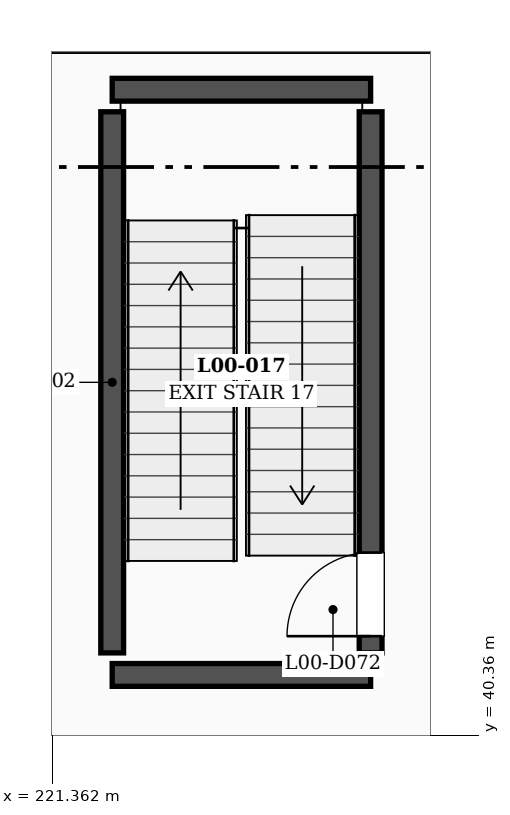
"""IFC4 building model, lengths in metres.
Left out: names, types, materials, properties, quantities, classifications, styles, units other than length and angle.
Written with IfcOpenShell. Run it as: python <this file> out.ifc"""

import sys

from ifc_helpers import new_model, si_unit, direction, frame, frame_2d, origin, place, context, subcontext, project, spatial, rectangle, extrude, element, fill, save


model = new_model("IFC4")
c1 = context("Model", 3, precision=1e-05, world=origin(), true_north=direction((0.0, 1.0)))
c2 = subcontext(c1, "Body", "Model", "MODEL_VIEW")
j1 = project(units=[si_unit("LENGTHUNIT", "METRE"), si_unit("PLANEANGLEUNIT", "RADIAN")], contexts=[c1])
p1 = place(None, origin())
s1 = spatial("IfcSite", under=j1, at=p1, CompositionType="ELEMENT")
p2 = place(p1, origin())
s2 = spatial("IfcBuilding", under=s1, at=p2, CompositionType="ELEMENT")
p3 = place(p2, origin())
s3 = spatial("IfcBuildingStorey", under=s2, at=p3, CompositionType="ELEMENT", Elevation=0.0)
for number, where, z_axis, x_axis in (
    (1, (222.15, 41.15, 0.0), (0.0, 0.0, 1.0), (1.0, 0.0, 0.0)),
    (2, (222.15, 48.85, 0.0), (0.0, 0.0, 1.0), (1.0, 0.0, 0.0)),
):
    element("IfcWall", number, at=place(p3, frame(where, z_axis=z_axis, x_axis=x_axis)), inside=s3, PredefinedType="SHEAR", context=c2, shape_type="SweptSolid", body=[
        extrude(rectangle(XDim=3.4, YDim=0.3, at=frame_2d((1.7, 0.0))), origin(), (0.0, 0.0, 1.0), 6.0),
    ])
p4 = place(p3, frame((222.15, 41.44, 0.0), z_axis=(0.0, 0.0, 1.0), x_axis=(0.0, 1.0, 0.0)))
e3 = element("IfcWall", 3, at=p4, inside=s3, PredefinedType="SHEAR", context=c2, shape_type="SweptSolid", body=[
    extrude(rectangle(XDim=7.12, YDim=0.3, at=frame_2d((3.56, 0.0))), origin(), (0.0, 0.0, 1.0), 6.0),
])
p5 = place(p3, frame((225.55, 41.44, 0.0), z_axis=(0.0, 0.0, 1.0), x_axis=(0.0, 1.0, 0.0)))
e4 = element("IfcWall", 4, at=p5, inside=s3, PredefinedType="SHEAR", context=c2, shape_type="SweptSolid", body=[
    extrude(rectangle(XDim=7.12, YDim=0.3, at=frame_2d((3.56, 0.0))), origin(), (0.0, 0.0, 1.0), 6.0),
])
p6 = place(p5, frame((0.22, 0.0, 0.0)))
e5 = element("IfcOpeningElement", 5, at=p6, cuts=e4, PredefinedType="OPENING", context=c2, shape_type="SweptSolid", body=[
    extrude(rectangle(XDim=1.1, YDim=2.2, at=frame_2d((0.55, 1.1))), frame((0.0, 0.16, 0.0), z_axis=(0.0, -1.0, 0.0), x_axis=(1.0, 0.0, 0.0)), (0.0, 0.0, 1.0), 0.32),
])
p7 = place(p6, origin())
e6 = element("IfcDoor", 6, at=p7, inside=s3, OperationType="SINGLE_SWING_LEFT", PredefinedType="DOOR", context=c2, shape_type="SweptSolid", body=[
    extrude(rectangle(XDim=1.1, YDim=2.2, at=frame_2d((0.55, 1.1))), frame((0.0, 0.025, 0.0), z_axis=(0.0, -1.0, 0.0), x_axis=(1.0, 0.0, 0.0)), (0.0, 0.0, 1.0), 0.05),
])
fill(e5, e6)
save(model, sys.argv[1])
